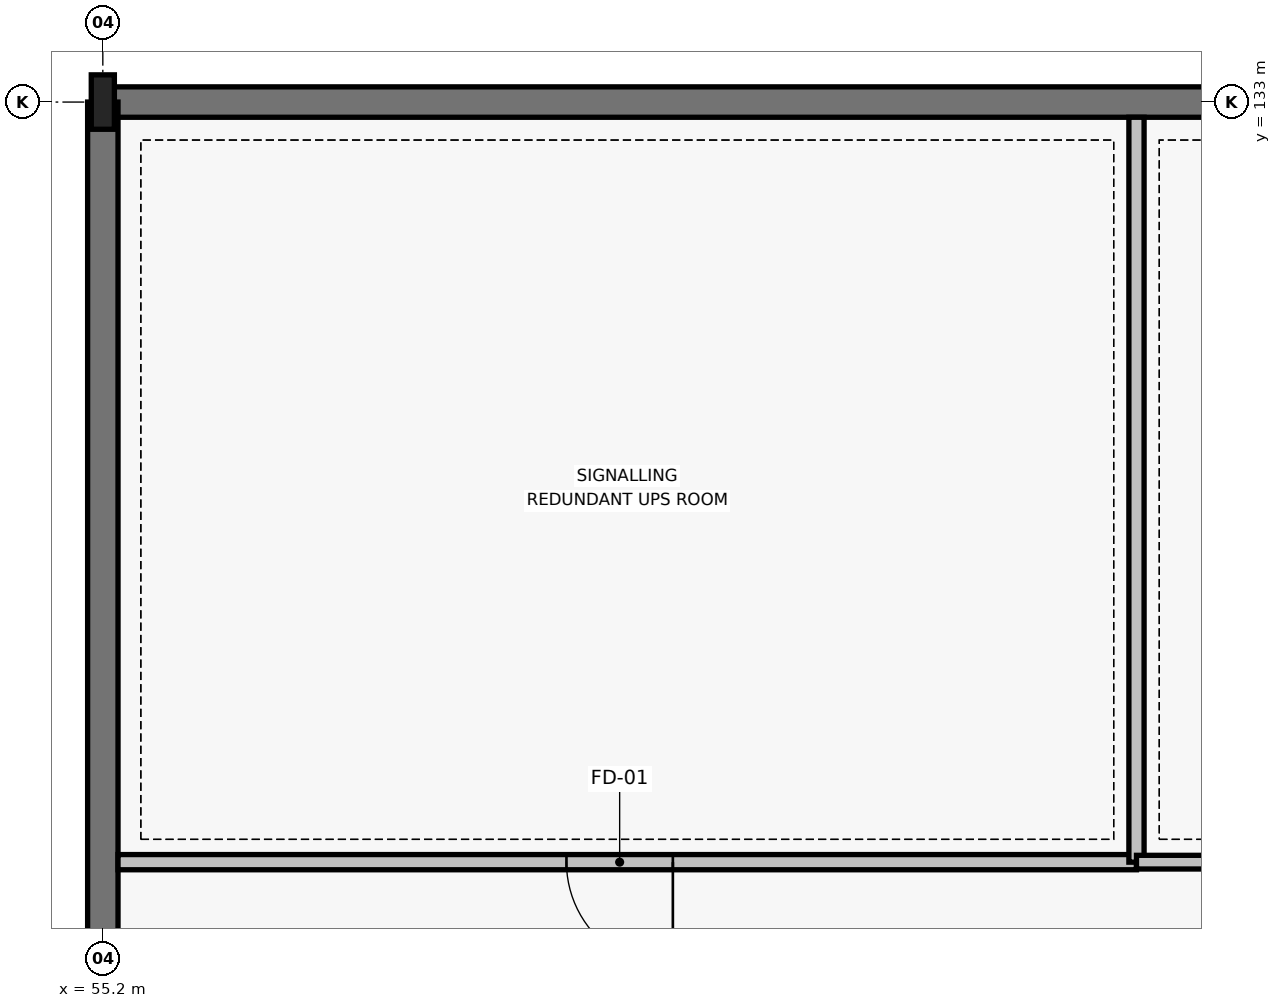
"""IFC4 building model, lengths in metres.
Left out: names, types, materials, properties, quantities, classifications, styles, units other than length and angle.
Written with IfcOpenShell. Run it as: python <this file> out.ifc"""

import sys

from ifc_helpers import new_model, si_unit, direction, frame, frame_2d, origin, origin_2d, place, context, subcontext, project, spatial, rectangle, i_section, extrude, element, fill, save


model = new_model("IFC4")
c1 = context("Model", 3, precision=1e-05, world=origin(), true_north=direction((0.0, 1.0)))
c2 = subcontext(c1, "Body", "Model", "MODEL_VIEW")
j1 = project(units=[si_unit("LENGTHUNIT", "METRE"), si_unit("PLANEANGLEUNIT", "RADIAN")], contexts=[c1])
p1 = place(None, origin())
s1 = spatial("IfcSite", under=j1, at=p1, CompositionType="ELEMENT")
p2 = place(p1, origin())
s2 = spatial("IfcBuilding", under=s1, at=p2, CompositionType="ELEMENT")
p3 = place(p2, frame((0.0, 0.0, -6.0)))
s3 = spatial("IfcBuildingStorey", under=s2, at=p3, CompositionType="ELEMENT", Elevation=-6.0)
p4 = place(p3, frame((55.2, 133.0, 0.0), z_axis=(0.0, 0.0, 1.0), x_axis=(1.0, 0.0, 0.0)))
e1 = element("IfcColumn", 1, at=p4, inside=s3, PredefinedType="COLUMN", context=c2, shape_type="SweptSolid", body=[
    extrude(i_section(OverallWidth=0.304, OverallDepth=0.716, WebThickness=0.021, FlangeThickness=0.04, FilletRadius=0.027, at=origin_2d()), origin(), (0.0, 0.0, 1.0), 6.0),
])
p5 = place(p3, frame((156.0, 133.0, 0.0), z_axis=(0.0, 0.0, 1.0), x_axis=(-1.0, 0.0, 0.0)))
e2 = element("IfcWall", 2, at=p5, inside=s3, PredefinedType="SOLIDWALL", context=c2, shape_type="SweptSolid", body=[
    extrude(rectangle(XDim=100.8, YDim=0.4, at=frame_2d((50.4, 0.0))), origin(), (0.0, 0.0, 1.0), 6.0),
])
p6 = place(p3, frame((55.2, 133.0, 0.0), z_axis=(0.0, 0.0, 1.0), x_axis=(0.0, -1.0, 0.0)))
e3 = element("IfcWall", 3, at=p6, inside=s3, PredefinedType="SOLIDWALL", context=c2, shape_type="SweptSolid", body=[
    extrude(rectangle(XDim=30.0, YDim=0.4, at=frame_2d((15.0, 0.0))), origin(), (0.0, 0.0, 1.0), 6.0),
])
p7 = place(p3, frame((55.4, 123.0, 0.0), z_axis=(0.0, 0.0, 1.0), x_axis=(1.0, 0.0, 0.0)))
e4 = element("IfcWall", 4, at=p7, inside=s3, PredefinedType="PARTITIONING", context=c2, shape_type="SweptSolid", body=[
    extrude(rectangle(XDim=13.4, YDim=0.2, at=frame_2d((6.7, 0.0))), origin(), (0.0, 0.0, 1.0), 5.75),
])
p8 = place(p7, frame((5.9, 0.0, 0.0)))
e5 = element("IfcOpeningElement", 5, at=p8, cuts=e4, PredefinedType="OPENING", context=c2, shape_type="SweptSolid", body=[
    extrude(rectangle(XDim=1.4, YDim=2.2, at=frame_2d((0.7, 1.1))), frame((0.0, 0.11, 0.0), z_axis=(0.0, -1.0, 0.0), x_axis=(1.0, 0.0, 0.0)), (0.0, 0.0, 1.0), 0.22),
])
p9 = place(p3, frame((68.8, 123.0, 0.0), z_axis=(0.0, 0.0, 1.0), x_axis=(0.0, 1.0, 0.0)))
e6 = element("IfcWall", 6, at=p9, inside=s3, PredefinedType="PARTITIONING", context=c2, shape_type="SweptSolid", body=[
    extrude(rectangle(XDim=9.8, YDim=0.2, at=frame_2d((4.9, 0.0))), origin(), (0.0, 0.0, 1.0), 5.75),
])
p10 = place(p3, frame((68.8, 123.0, 0.0), z_axis=(0.0, 0.0, 1.0), x_axis=(1.0, 0.0, 0.0)))
e7 = element("IfcWall", 7, at=p10, inside=s3, PredefinedType="PARTITIONING", context=c2, shape_type="SweptSolid", body=[
    extrude(rectangle(XDim=16.6, YDim=0.18, at=frame_2d((8.3, 0.0))), origin(), (0.0, 0.0, 1.0), 5.75),
])
p11 = place(p10, frame((7.4, 0.0, 0.0)))
e8 = element("IfcOpeningElement", 8, at=p11, cuts=e7, PredefinedType="OPENING", context=c2, shape_type="SweptSolid", body=[
    extrude(rectangle(XDim=1.6, YDim=2.25, at=frame_2d((0.8, 1.125))), frame((0.0, 0.1, 0.0), z_axis=(0.0, -1.0, 0.0), x_axis=(1.0, 0.0, 0.0)), (0.0, 0.0, 1.0), 0.2),
])
p12 = place(p8, origin())
e9 = element("IfcDoor", 9, at=p12, inside=s3, OperationType="SINGLE_SWING_RIGHT", PredefinedType="DOOR", context=c2, shape_type="SweptSolid", body=[
    extrude(rectangle(XDim=1.4, YDim=2.2, at=frame_2d((0.7, 1.1))), frame((0.0, 0.025, 0.0), z_axis=(0.0, -1.0, 0.0), x_axis=(1.0, 0.0, 0.0)), (0.0, 0.0, 1.0), 0.05),
])
fill(e5, e9)
save(model, sys.argv[1])
